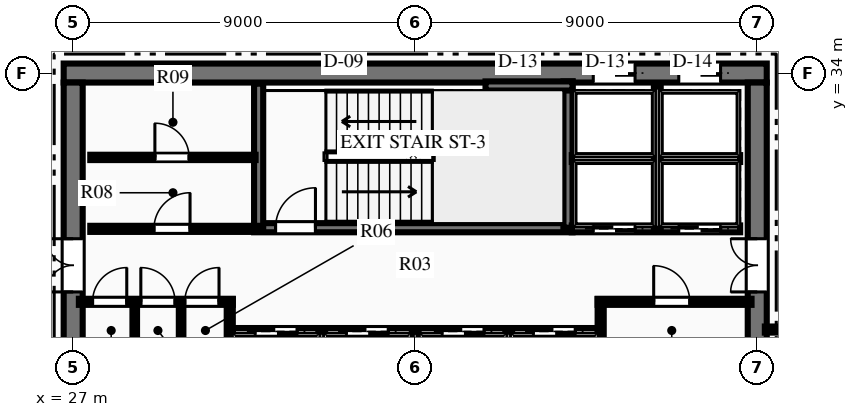
"""IFC4 building model, lengths in metres.
Left out: names, types, materials, properties, quantities, classifications, styles, units other than length and angle.
Written with IfcOpenShell. Run it as: python <this file> out.ifc"""

import sys

from ifc_helpers import new_model, si_unit, direction, frame, frame_2d, origin, place, context, subcontext, project, spatial, rectangle, extrude, element, fill, save


model = new_model("IFC4")
c1 = context("Model", 3, precision=1e-05, world=origin(), true_north=direction((0.0, 1.0)))
c2 = subcontext(c1, "Body", "Model", "MODEL_VIEW")
j1 = project(units=[si_unit("LENGTHUNIT", "METRE"), si_unit("PLANEANGLEUNIT", "RADIAN")], contexts=[c1])
p1 = place(None, origin())
s1 = spatial("IfcSite", under=j1, at=p1, CompositionType="ELEMENT")
p2 = place(p1, origin())
s2 = spatial("IfcBuilding", under=s1, at=p2, CompositionType="ELEMENT")
p3 = place(p2, frame((0.0, 0.0, 163.2)))
s3 = spatial("IfcBuildingStorey", under=s2, at=p3, CompositionType="ELEMENT", Elevation=163.2)
p4 = place(p3, frame((26.75, 34.0, 0.0), z_axis=(0.0, 0.0, 1.0), x_axis=(1.0, 0.0, 0.0)))
e1 = element("IfcWall", 1, at=p4, inside=s3, PredefinedType="SHEAR", context=c2, shape_type="SweptSolid", body=[
    extrude(rectangle(XDim=18.5, YDim=0.5, at=frame_2d((9.25, 0.0))), origin(), (0.0, 0.0, 1.0), 3.75),
])
p5 = place(p4, frame((13.935, 0.0, 0.0)))
e2 = element("IfcOpeningElement", 2, at=p5, cuts=e1, PredefinedType="OPENING", context=c2, shape_type="SweptSolid", body=[
    extrude(rectangle(XDim=1.1, YDim=2.15, at=frame_2d((0.55, 1.075))), frame((0.0, 0.26, 0.0), z_axis=(0.0, -1.0, 0.0), x_axis=(1.0, 0.0, 0.0)), (0.0, 0.0, 1.0), 0.52),
])
p6 = place(p4, frame((16.185, 0.0, 0.0)))
e3 = element("IfcOpeningElement", 3, at=p6, cuts=e1, PredefinedType="OPENING", context=c2, shape_type="SweptSolid", body=[
    extrude(rectangle(XDim=1.1, YDim=2.15, at=frame_2d((0.55, 1.075))), frame((0.0, 0.26, 0.0), z_axis=(0.0, -1.0, 0.0), x_axis=(1.0, 0.0, 0.0)), (0.0, 0.0, 1.0), 0.52),
])
p7 = place(p3, frame((27.0, 18.25, 0.0), z_axis=(0.0, 0.0, 1.0), x_axis=(0.0, 1.0, 0.0)))
e4 = element("IfcWall", 4, at=p7, inside=s3, PredefinedType="SHEAR", context=c2, shape_type="SweptSolid", body=[
    extrude(rectangle(XDim=15.5, YDim=0.5, at=frame_2d((7.75, 0.0))), origin(), (0.0, 0.0, 1.0), 3.75),
])
p8 = place(p7, frame((9.99, 0.0, 0.0)))
e5 = element("IfcOpeningElement", 5, at=p8, cuts=e4, PredefinedType="OPENING", context=c2, shape_type="SweptSolid", body=[
    extrude(rectangle(XDim=1.4, YDim=2.2, at=frame_2d((0.7, 1.1))), frame((0.0, 0.26, 0.0), z_axis=(0.0, -1.0, 0.0), x_axis=(1.0, 0.0, 0.0)), (0.0, 0.0, 1.0), 0.52),
])
p9 = place(p3, frame((45.0, 18.25, 0.0), z_axis=(0.0, 0.0, 1.0), x_axis=(0.0, 1.0, 0.0)))
e6 = element("IfcWall", 6, at=p9, inside=s3, PredefinedType="SHEAR", context=c2, shape_type="SweptSolid", body=[
    extrude(rectangle(XDim=15.5, YDim=0.5, at=frame_2d((7.75, 0.0))), origin(), (0.0, 0.0, 1.0), 3.75),
])
p10 = place(p9, frame((9.99, 0.0, 0.0)))
e7 = element("IfcOpeningElement", 7, at=p10, cuts=e6, PredefinedType="OPENING", context=c2, shape_type="SweptSolid", body=[
    extrude(rectangle(XDim=1.4, YDim=2.2, at=frame_2d((0.7, 1.1))), frame((0.0, 0.26, 0.0), z_axis=(0.0, -1.0, 0.0), x_axis=(1.0, 0.0, 0.0)), (0.0, 0.0, 1.0), 0.52),
])
p11 = place(p3, frame((31.76, 29.93, 0.0), z_axis=(0.0, 0.0, 1.0), x_axis=(1.0, 0.0, 0.0)))
e8 = element("IfcWall", 8, at=p11, inside=s3, PredefinedType="SHEAR", context=c2, shape_type="SweptSolid", body=[
    extrude(rectangle(XDim=8.38, YDim=0.24, at=frame_2d((4.19, 0.0))), origin(), (0.0, 0.0, 1.0), 3.75),
])
p12 = place(p11, frame((0.565, 0.0, 0.0)))
e9 = element("IfcOpeningElement", 9, at=p12, cuts=e8, PredefinedType="OPENING", context=c2, shape_type="SweptSolid", body=[
    extrude(rectangle(XDim=1.05, YDim=2.15, at=frame_2d((0.525, 1.075))), frame((0.0, 0.13, 0.0), z_axis=(0.0, -1.0, 0.0), x_axis=(1.0, 0.0, 0.0)), (0.0, 0.0, 1.0), 0.26),
])
p13 = place(p3, frame((31.88, 29.93, 0.0), z_axis=(0.0, 0.0, 1.0), x_axis=(0.0, 1.0, 0.0)))
e10 = element("IfcWall", 10, at=p13, inside=s3, PredefinedType="SHEAR", context=c2, shape_type="SweptSolid", body=[
    extrude(rectangle(XDim=3.79, YDim=0.24, at=frame_2d((1.895, 0.0))), origin(), (0.0, 0.0, 1.0), 3.75),
])
p14 = place(p3, frame((40.02, 29.93, 0.0), z_axis=(0.0, 0.0, 1.0), x_axis=(0.0, 1.0, 0.0)))
e11 = element("IfcWall", 11, at=p14, inside=s3, PredefinedType="SHEAR", context=c2, shape_type="SweptSolid", body=[
    extrude(rectangle(XDim=3.85, YDim=0.24, at=frame_2d((1.925, 0.0))), origin(), (0.0, 0.0, 1.0), 3.75),
])
p15 = place(p3, frame((37.85, 33.66, 0.0), z_axis=(0.0, 0.0, 1.0), x_axis=(1.0, 0.0, 0.0)))
e12 = element("IfcWall", 12, at=p15, inside=s3, PredefinedType="SHEAR", context=c2, shape_type="SweptSolid", body=[
    extrude(rectangle(XDim=2.29, YDim=0.24, at=frame_2d((1.145, 0.0))), origin(), (0.0, 0.0, 1.0), 3.75),
])
p16 = place(p3, frame((27.15, 27.98, 0.0), z_axis=(0.0, 0.0, 1.0), x_axis=(1.0, 0.0, 0.0)))
e13 = element("IfcWall", 13, at=p16, inside=s3, PredefinedType="PARTITIONING", context=c2, shape_type="SweptSolid", body=[
    extrude(rectangle(XDim=4.05, YDim=0.16, at=frame_2d((2.025, 0.0))), origin(), (0.0, 0.0, 1.0), 3.46),
])
p17 = place(p16, frame((0.36, 0.0, 0.0)))
e14 = element("IfcOpeningElement", 14, at=p17, cuts=e13, PredefinedType="OPENING", context=c2, shape_type="SweptSolid", body=[
    extrude(rectangle(XDim=0.9, YDim=2.15, at=frame_2d((0.45, 1.075))), frame((0.0, 0.09, 0.0), z_axis=(0.0, -1.0, 0.0), x_axis=(1.0, 0.0, 0.0)), (0.0, 0.0, 1.0), 0.18),
])
p18 = place(p16, frame((1.63, 0.0, 0.0)))
e15 = element("IfcOpeningElement", 15, at=p18, cuts=e13, PredefinedType="OPENING", context=c2, shape_type="SweptSolid", body=[
    extrude(rectangle(XDim=0.9, YDim=2.15, at=frame_2d((0.45, 1.075))), frame((0.0, 0.09, 0.0), z_axis=(0.0, -1.0, 0.0), x_axis=(1.0, 0.0, 0.0)), (0.0, 0.0, 1.0), 0.18),
])
p19 = place(p16, frame((2.788, 0.0, 0.0)))
e16 = element("IfcOpeningElement", 16, at=p19, cuts=e13, PredefinedType="OPENING", context=c2, shape_type="SweptSolid", body=[
    extrude(rectangle(XDim=0.9, YDim=2.15, at=frame_2d((0.45, 1.075))), frame((0.0, 0.09, 0.0), z_axis=(0.0, -1.0, 0.0), x_axis=(1.0, 0.0, 0.0)), (0.0, 0.0, 1.0), 0.18),
])
p20 = place(p3, frame((31.12, 26.54, 0.0), z_axis=(0.0, 0.0, 1.0), x_axis=(0.0, 1.0, 0.0)))
e17 = element("IfcWall", 17, at=p20, inside=s3, PredefinedType="PARTITIONING", context=c2, shape_type="SweptSolid", body=[
    extrude(rectangle(XDim=1.51, YDim=0.16, at=frame_2d((0.755, 0.0))), origin(), (0.0, 0.0, 1.0), 3.46),
])
p21 = place(p3, frame((40.8, 27.98, 0.0), z_axis=(0.0, 0.0, 1.0), x_axis=(1.0, 0.0, 0.0)))
e18 = element("IfcWall", 18, at=p21, inside=s3, PredefinedType="PARTITIONING", context=c2, shape_type="SweptSolid", body=[
    extrude(rectangle(XDim=4.05, YDim=0.16, at=frame_2d((2.025, 0.0))), origin(), (0.0, 0.0, 1.0), 3.46),
])
p22 = place(p21, frame((1.475, 0.0, 0.0)))
e19 = element("IfcOpeningElement", 19, at=p22, cuts=e18, PredefinedType="OPENING", context=c2, shape_type="SweptSolid", body=[
    extrude(rectangle(XDim=0.95, YDim=2.15, at=frame_2d((0.475, 1.075))), frame((0.0, 0.09, 0.0), z_axis=(0.0, -1.0, 0.0), x_axis=(1.0, 0.0, 0.0)), (0.0, 0.0, 1.0), 0.18),
])
p23 = place(p3, frame((40.88, 26.54, 0.0), z_axis=(0.0, 0.0, 1.0), x_axis=(0.0, 1.0, 0.0)))
e20 = element("IfcWall", 20, at=p23, inside=s3, PredefinedType="PARTITIONING", context=c2, shape_type="SweptSolid", body=[
    extrude(rectangle(XDim=1.51, YDim=0.16, at=frame_2d((0.755, 0.0))), origin(), (0.0, 0.0, 1.0), 3.46),
])
for number, where, z_axis, x_axis in (
    (21, (28.62, 26.54, 0.0), (0.0, 0.0, 1.0), (0.0, 1.0, 0.0)),
    (22, (29.84, 26.54, 0.0), (0.0, 0.0, 1.0), (0.0, 1.0, 0.0)),
):
    element("IfcWall", number, at=place(p3, frame(where, z_axis=z_axis, x_axis=x_axis)), inside=s3, PredefinedType="PARTITIONING", context=c2, shape_type="SweptSolid", body=[
        extrude(rectangle(XDim=1.44, YDim=0.12, at=frame_2d((0.72, 0.0))), origin(), (0.0, 0.0, 1.0), 3.46),
    ])
p24 = place(p3, frame((27.45, 29.9, 0.0), z_axis=(0.0, 0.0, 1.0), x_axis=(1.0, 0.0, 0.0)))
e23 = element("IfcWall", 23, at=p24, inside=s3, PredefinedType="PARTITIONING", context=c2, shape_type="SweptSolid", body=[
    extrude(rectangle(XDim=4.43, YDim=0.16, at=frame_2d((2.215, 0.0))), origin(), (0.0, 0.0, 1.0), 3.46),
])
p25 = place(p24, frame((1.675, 0.0, 0.0)))
e24 = element("IfcOpeningElement", 24, at=p25, cuts=e23, PredefinedType="OPENING", context=c2, shape_type="SweptSolid", body=[
    extrude(rectangle(XDim=0.95, YDim=2.15, at=frame_2d((0.475, 1.075))), frame((0.0, 0.09, 0.0), z_axis=(0.0, -1.0, 0.0), x_axis=(1.0, 0.0, 0.0)), (0.0, 0.0, 1.0), 0.18),
])
p26 = place(p3, frame((27.45, 31.78, 0.0), z_axis=(0.0, 0.0, 1.0), x_axis=(1.0, 0.0, 0.0)))
e25 = element("IfcWall", 25, at=p26, inside=s3, PredefinedType="PARTITIONING", context=c2, shape_type="SweptSolid", body=[
    extrude(rectangle(XDim=4.35, YDim=0.14, at=frame_2d((2.175, 0.0))), origin(), (0.0, 0.0, 1.0), 3.46),
])
p27 = place(p26, frame((1.7, 0.0, 0.0)))
e26 = element("IfcOpeningElement", 26, at=p27, cuts=e25, PredefinedType="OPENING", context=c2, shape_type="SweptSolid", body=[
    extrude(rectangle(XDim=0.9, YDim=2.15, at=frame_2d((0.45, 1.075))), frame((0.0, 0.08, 0.0), z_axis=(0.0, -1.0, 0.0), x_axis=(1.0, 0.0, 0.0)), (0.0, 0.0, 1.0), 0.16),
])
p28 = place(p3, frame((40.12, 29.9, 0.0), z_axis=(0.0, 0.0, 1.0), x_axis=(1.0, 0.0, 0.0)))
e27 = element("IfcWall", 27, at=p28, inside=s3, PredefinedType="PARTITIONING", context=c2, shape_type="SweptSolid", body=[
    extrude(rectangle(XDim=4.43, YDim=0.18, at=frame_2d((2.215, 0.0))), origin(), (0.0, 0.0, 1.0), 3.46),
])
p29 = place(p28, frame((0.565, 0.0, 0.0)))
e28 = element("IfcOpeningElement", 28, at=p29, cuts=e27, PredefinedType="OPENING", context=c2, shape_type="SweptSolid", body=[
    extrude(rectangle(XDim=1.1, YDim=2.15, at=frame_2d((0.55, 1.075))), frame((0.0, 0.1, 0.0), z_axis=(0.0, -1.0, 0.0), x_axis=(1.0, 0.0, 0.0)), (0.0, 0.0, 1.0), 0.2),
])
p30 = place(p28, frame((2.815, 0.0, 0.0)))
e29 = element("IfcOpeningElement", 29, at=p30, cuts=e27, PredefinedType="OPENING", context=c2, shape_type="SweptSolid", body=[
    extrude(rectangle(XDim=1.1, YDim=2.15, at=frame_2d((0.55, 1.075))), frame((0.0, 0.1, 0.0), z_axis=(0.0, -1.0, 0.0), x_axis=(1.0, 0.0, 0.0)), (0.0, 0.0, 1.0), 0.2),
])
p31 = place(p3, frame((40.12, 31.75, 0.0), z_axis=(0.0, 0.0, 1.0), x_axis=(1.0, 0.0, 0.0)))
e30 = element("IfcWall", 30, at=p31, inside=s3, PredefinedType="PARTITIONING", context=c2, shape_type="SweptSolid", body=[
    extrude(rectangle(XDim=4.43, YDim=0.18, at=frame_2d((2.215, 0.0))), origin(), (0.0, 0.0, 1.0), 3.46),
])
p32 = place(p3, frame((42.37, 29.9, 0.0), z_axis=(0.0, 0.0, 1.0), x_axis=(0.0, 1.0, 0.0)))
e31 = element("IfcWall", 31, at=p32, inside=s3, PredefinedType="PARTITIONING", context=c2, shape_type="SweptSolid", body=[
    extrude(rectangle(XDim=3.75, YDim=0.18, at=frame_2d((1.875, 0.0))), origin(), (0.0, 0.0, 1.0), 3.46),
])
p33 = place(p3, frame((31.2, 27.2, 0.0), z_axis=(0.0, 0.0, 1.0), x_axis=(1.0, 0.0, 0.0)))
e32 = element("IfcWall", 32, at=p33, inside=s3, PredefinedType="PARTITIONING", context=c2, shape_type="SweptSolid", body=[
    extrude(rectangle(XDim=9.6, YDim=0.18, at=frame_2d((4.8, 0.0))), origin(), (0.0, 0.0, 1.0), 3.46),
])
p34 = place(p33, frame((0.59, 0.0, 0.0)))
e33 = element("IfcOpeningElement", 33, at=p34, cuts=e32, PredefinedType="OPENING", context=c2, shape_type="SweptSolid", body=[
    extrude(rectangle(XDim=1.1, YDim=2.15, at=frame_2d((0.55, 1.075))), frame((0.0, 0.1, 0.0), z_axis=(0.0, -1.0, 0.0), x_axis=(1.0, 0.0, 0.0)), (0.0, 0.0, 1.0), 0.2),
])
p35 = place(p33, frame((2.99, 0.0, 0.0)))
e34 = element("IfcOpeningElement", 34, at=p35, cuts=e32, PredefinedType="OPENING", context=c2, shape_type="SweptSolid", body=[
    extrude(rectangle(XDim=1.1, YDim=2.15, at=frame_2d((0.55, 1.075))), frame((0.0, 0.1, 0.0), z_axis=(0.0, -1.0, 0.0), x_axis=(1.0, 0.0, 0.0)), (0.0, 0.0, 1.0), 0.2),
])
p36 = place(p33, frame((5.51, 0.0, 0.0)))
e35 = element("IfcOpeningElement", 35, at=p36, cuts=e32, PredefinedType="OPENING", context=c2, shape_type="SweptSolid", body=[
    extrude(rectangle(XDim=1.1, YDim=2.15, at=frame_2d((0.55, 1.075))), frame((0.0, 0.1, 0.0), z_axis=(0.0, -1.0, 0.0), x_axis=(1.0, 0.0, 0.0)), (0.0, 0.0, 1.0), 0.2),
])
p37 = place(p33, frame((7.91, 0.0, 0.0)))
e36 = element("IfcOpeningElement", 36, at=p37, cuts=e32, PredefinedType="OPENING", context=c2, shape_type="SweptSolid", body=[
    extrude(rectangle(XDim=1.1, YDim=2.15, at=frame_2d((0.55, 1.075))), frame((0.0, 0.1, 0.0), z_axis=(0.0, -1.0, 0.0), x_axis=(1.0, 0.0, 0.0)), (0.0, 0.0, 1.0), 0.2),
])
for number, where, z_axis, x_axis in (
    (37, (33.54, 25.3, 0.0), (0.0, 0.0, 1.0), (0.0, 1.0, 0.0)),
    (38, (36.0, 25.3, 0.0), (0.0, 0.0, 1.0), (0.0, 1.0, 0.0)),
    (39, (38.46, 25.3, 0.0), (0.0, 0.0, 1.0), (0.0, 1.0, 0.0)),
):
    element("IfcWall", number, at=place(p3, frame(where, z_axis=z_axis, x_axis=x_axis)), inside=s3, PredefinedType="PARTITIONING", context=c2, shape_type="SweptSolid", body=[
        extrude(rectangle(XDim=1.9, YDim=0.18, at=frame_2d((0.95, 0.0))), origin(), (0.0, 0.0, 1.0), 3.46),
    ])
p38 = place(p3, frame((45.2, 27.25, 0.0), z_axis=(0.0, 0.0, 1.0), x_axis=(1.0, 0.0, 0.0)))
e40 = element("IfcWall", 40, at=p38, inside=s3, PredefinedType="PARTITIONING", context=c2, shape_type="SweptSolid", body=[
    extrude(rectangle(XDim=2.25, YDim=0.16, at=frame_2d((1.125, 0.0))), origin(), (0.0, 0.0, 1.0), 3.46),
])
p39 = place(p17, origin())
e41 = element("IfcDoor", 41, at=p39, inside=s3, OperationType="SINGLE_SWING_RIGHT", PredefinedType="DOOR", context=c2, shape_type="SweptSolid", body=[
    extrude(rectangle(XDim=0.9, YDim=2.15, at=frame_2d((0.45, 1.075))), frame((0.0, 0.025, 0.0), z_axis=(0.0, -1.0, 0.0), x_axis=(1.0, 0.0, 0.0)), (0.0, 0.0, 1.0), 0.05),
])
fill(e14, e41)
p40 = place(p18, origin())
e42 = element("IfcDoor", 42, at=p40, inside=s3, OperationType="SINGLE_SWING_LEFT", PredefinedType="DOOR", context=c2, shape_type="SweptSolid", body=[
    extrude(rectangle(XDim=0.9, YDim=2.15, at=frame_2d((0.45, 1.075))), frame((0.0, 0.025, 0.0), z_axis=(0.0, -1.0, 0.0), x_axis=(1.0, 0.0, 0.0)), (0.0, 0.0, 1.0), 0.05),
])
fill(e15, e42)
p41 = place(p19, origin())
e43 = element("IfcDoor", 43, at=p41, inside=s3, OperationType="SINGLE_SWING_RIGHT", PredefinedType="DOOR", context=c2, shape_type="SweptSolid", body=[
    extrude(rectangle(XDim=0.9, YDim=2.15, at=frame_2d((0.45, 1.075))), frame((0.0, 0.025, 0.0), z_axis=(0.0, -1.0, 0.0), x_axis=(1.0, 0.0, 0.0)), (0.0, 0.0, 1.0), 0.05),
])
fill(e16, e43)
p42 = place(p22, origin())
e44 = element("IfcDoor", 44, at=p42, inside=s3, OperationType="SINGLE_SWING_LEFT", PredefinedType="DOOR", context=c2, shape_type="SweptSolid", body=[
    extrude(rectangle(XDim=0.95, YDim=2.15, at=frame_2d((0.475, 1.075))), frame((0.0, 0.025, 0.0), z_axis=(0.0, -1.0, 0.0), x_axis=(1.0, 0.0, 0.0)), (0.0, 0.0, 1.0), 0.05),
])
fill(e19, e44)
p43 = place(p25, origin())
e45 = element("IfcDoor", 45, at=p43, inside=s3, OperationType="SINGLE_SWING_RIGHT", PredefinedType="DOOR", context=c2, shape_type="SweptSolid", body=[
    extrude(rectangle(XDim=0.95, YDim=2.15, at=frame_2d((0.475, 1.075))), frame((0.0, 0.025, 0.0), z_axis=(0.0, -1.0, 0.0), x_axis=(1.0, 0.0, 0.0)), (0.0, 0.0, 1.0), 0.05),
])
fill(e24, e45)
p44 = place(p27, origin())
e46 = element("IfcDoor", 46, at=p44, inside=s3, OperationType="SINGLE_SWING_LEFT", PredefinedType="DOOR", context=c2, shape_type="SweptSolid", body=[
    extrude(rectangle(XDim=0.9, YDim=2.15, at=frame_2d((0.45, 1.075))), frame((0.0, 0.025, 0.0), z_axis=(0.0, -1.0, 0.0), x_axis=(1.0, 0.0, 0.0)), (0.0, 0.0, 1.0), 0.05),
])
fill(e26, e46)
p45 = place(p12, origin())
e47 = element("IfcDoor", 47, at=p45, inside=s3, OperationType="SINGLE_SWING_RIGHT", PredefinedType="DOOR", context=c2, shape_type="SweptSolid", body=[
    extrude(rectangle(XDim=1.05, YDim=2.15, at=frame_2d((0.525, 1.075))), frame((0.0, 0.025, 0.0), z_axis=(0.0, -1.0, 0.0), x_axis=(1.0, 0.0, 0.0)), (0.0, 0.0, 1.0), 0.05),
])
fill(e9, e47)
p46 = place(p8, origin())
e48 = element("IfcDoor", 48, at=p46, inside=s3, OperationType="DOUBLE_DOOR_SINGLE_SWING", PredefinedType="DOOR", context=c2, shape_type="SweptSolid", body=[
    extrude(rectangle(XDim=1.4, YDim=2.2, at=frame_2d((0.7, 1.1))), frame((0.0, 0.025, 0.0), z_axis=(0.0, -1.0, 0.0), x_axis=(1.0, 0.0, 0.0)), (0.0, 0.0, 1.0), 0.05),
])
fill(e5, e48)
p47 = place(p10, origin())
e49 = element("IfcDoor", 49, at=p47, inside=s3, OperationType="DOUBLE_DOOR_SINGLE_SWING", PredefinedType="DOOR", context=c2, shape_type="SweptSolid", body=[
    extrude(rectangle(XDim=1.4, YDim=2.2, at=frame_2d((0.7, 1.1))), frame((0.0, 0.025, 0.0), z_axis=(0.0, -1.0, 0.0), x_axis=(1.0, 0.0, 0.0)), (0.0, 0.0, 1.0), 0.05),
])
fill(e7, e49)
p48 = place(p29, origin())
e50 = element("IfcDoor", 50, at=p48, inside=s3, OperationType="SLIDING_TO_LEFT", PredefinedType="DOOR", context=c2, shape_type="SweptSolid", body=[
    extrude(rectangle(XDim=1.1, YDim=2.15, at=frame_2d((0.55, 1.075))), frame((0.0, 0.025, 0.0), z_axis=(0.0, -1.0, 0.0), x_axis=(1.0, 0.0, 0.0)), (0.0, 0.0, 1.0), 0.05),
])
fill(e28, e50)
p49 = place(p30, origin())
e51 = element("IfcDoor", 51, at=p49, inside=s3, OperationType="SLIDING_TO_LEFT", PredefinedType="DOOR", context=c2, shape_type="SweptSolid", body=[
    extrude(rectangle(XDim=1.1, YDim=2.15, at=frame_2d((0.55, 1.075))), frame((0.0, 0.025, 0.0), z_axis=(0.0, -1.0, 0.0), x_axis=(1.0, 0.0, 0.0)), (0.0, 0.0, 1.0), 0.05),
])
fill(e29, e51)
p50 = place(p5, origin())
e52 = element("IfcDoor", 52, at=p50, inside=s3, OperationType="SLIDING_TO_LEFT", PredefinedType="DOOR", context=c2, shape_type="SweptSolid", body=[
    extrude(rectangle(XDim=1.1, YDim=2.15, at=frame_2d((0.55, 1.075))), frame((0.0, 0.025, 0.0), z_axis=(0.0, -1.0, 0.0), x_axis=(1.0, 0.0, 0.0)), (0.0, 0.0, 1.0), 0.05),
])
fill(e2, e52)
p51 = place(p6, origin())
e53 = element("IfcDoor", 53, at=p51, inside=s3, OperationType="SLIDING_TO_LEFT", PredefinedType="DOOR", context=c2, shape_type="SweptSolid", body=[
    extrude(rectangle(XDim=1.1, YDim=2.15, at=frame_2d((0.55, 1.075))), frame((0.0, 0.025, 0.0), z_axis=(0.0, -1.0, 0.0), x_axis=(1.0, 0.0, 0.0)), (0.0, 0.0, 1.0), 0.05),
])
fill(e3, e53)
p52 = place(p34, origin())
e54 = element("IfcDoor", 54, at=p52, inside=s3, OperationType="SLIDING_TO_LEFT", PredefinedType="DOOR", context=c2, shape_type="SweptSolid", body=[
    extrude(rectangle(XDim=1.1, YDim=2.15, at=frame_2d((0.55, 1.075))), frame((0.0, 0.025, 0.0), z_axis=(0.0, -1.0, 0.0), x_axis=(1.0, 0.0, 0.0)), (0.0, 0.0, 1.0), 0.05),
])
fill(e33, e54)
p53 = place(p35, origin())
e55 = element("IfcDoor", 55, at=p53, inside=s3, OperationType="SLIDING_TO_LEFT", PredefinedType="DOOR", context=c2, shape_type="SweptSolid", body=[
    extrude(rectangle(XDim=1.1, YDim=2.15, at=frame_2d((0.55, 1.075))), frame((0.0, 0.025, 0.0), z_axis=(0.0, -1.0, 0.0), x_axis=(1.0, 0.0, 0.0)), (0.0, 0.0, 1.0), 0.05),
])
fill(e34, e55)
p54 = place(p36, origin())
e56 = element("IfcDoor", 56, at=p54, inside=s3, OperationType="SLIDING_TO_LEFT", PredefinedType="DOOR", context=c2, shape_type="SweptSolid", body=[
    extrude(rectangle(XDim=1.1, YDim=2.15, at=frame_2d((0.55, 1.075))), frame((0.0, 0.025, 0.0), z_axis=(0.0, -1.0, 0.0), x_axis=(1.0, 0.0, 0.0)), (0.0, 0.0, 1.0), 0.05),
])
fill(e35, e56)
p55 = place(p37, origin())
e57 = element("IfcDoor", 57, at=p55, inside=s3, OperationType="SLIDING_TO_LEFT", PredefinedType="DOOR", context=c2, shape_type="SweptSolid", body=[
    extrude(rectangle(XDim=1.1, YDim=2.15, at=frame_2d((0.55, 1.075))), frame((0.0, 0.025, 0.0), z_axis=(0.0, -1.0, 0.0), x_axis=(1.0, 0.0, 0.0)), (0.0, 0.0, 1.0), 0.05),
])
fill(e36, e57)
save(model, sys.argv[1])
